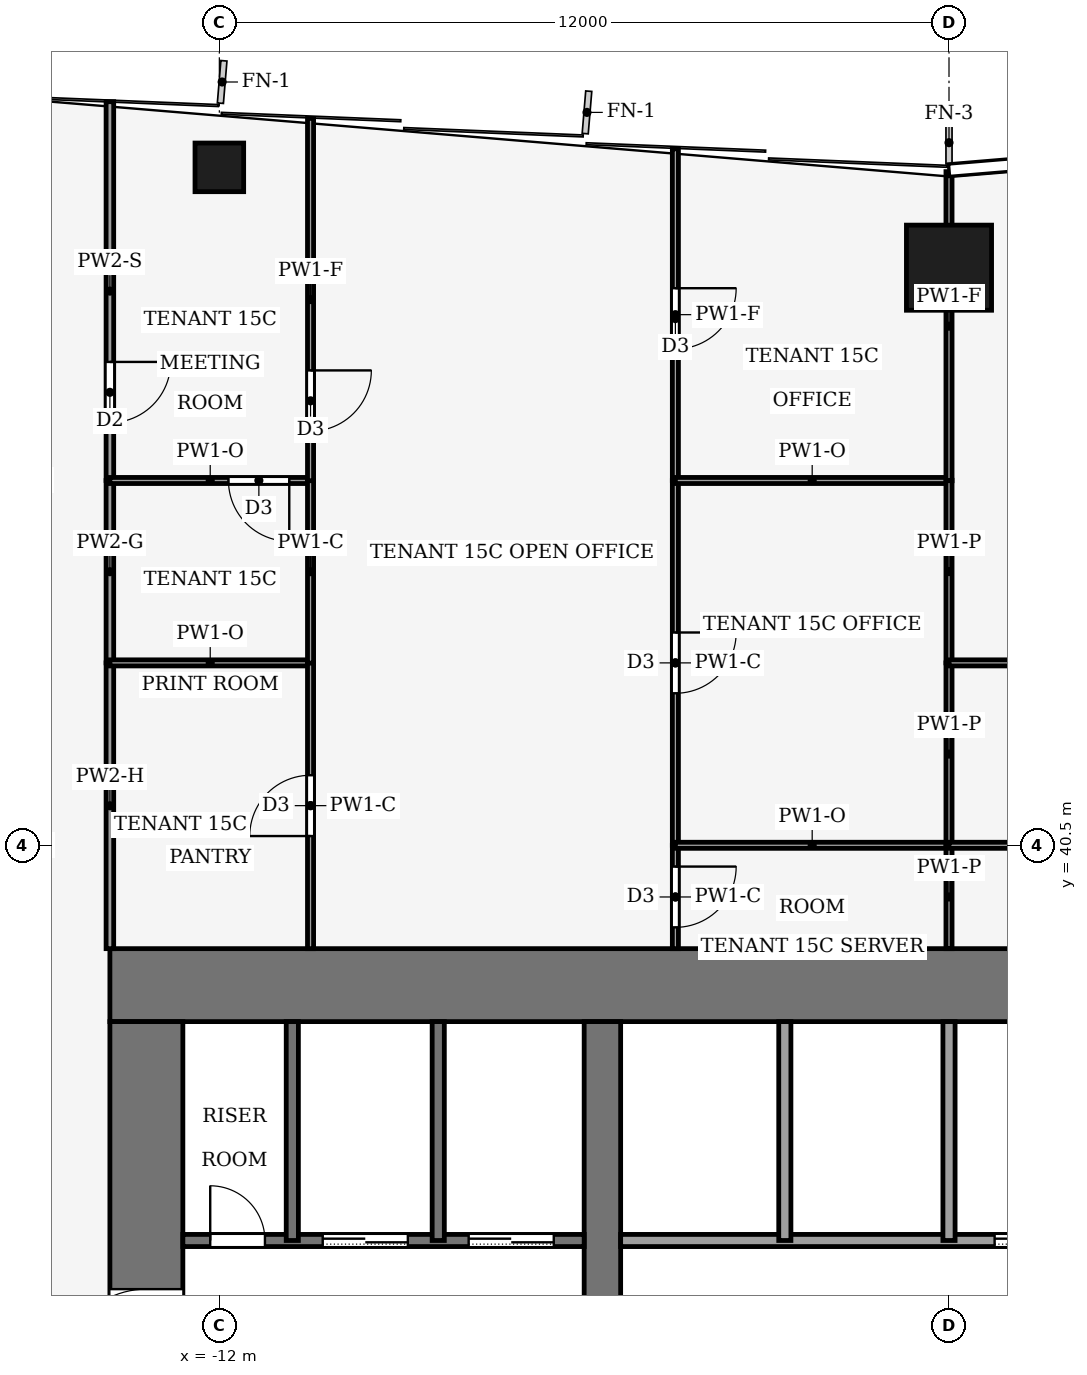
"""IFC4 building model, lengths in metres.
Left out: names, types, materials, properties, quantities, classifications, styles, units other than length and angle.
Written with IfcOpenShell. Run it as: python <this file> out.ifc"""

import sys

from ifc_helpers import new_model, si_unit, direction, frame, frame_2d, origin, origin_2d, place, context, subcontext, project, spatial, rectangle, hollow_rectangle, extrude, element, fill, save


model = new_model("IFC4")
c1 = context("Model", 3, precision=1e-05, world=origin(), true_north=direction((0.0, 1.0)))
c2 = subcontext(c1, "Body", "Model", "MODEL_VIEW")
j1 = project(units=[si_unit("LENGTHUNIT", "METRE"), si_unit("PLANEANGLEUNIT", "RADIAN")], contexts=[c1])
p1 = place(None, origin())
s1 = spatial("IfcSite", under=j1, at=p1, CompositionType="ELEMENT")
p2 = place(p1, origin())
s2 = spatial("IfcBuilding", under=s1, at=p2, CompositionType="ELEMENT")
p3 = place(p2, frame((0.0, 0.0, 70.0)))
s3 = spatial("IfcBuildingStorey", under=s2, at=p3, CompositionType="ELEMENT", Elevation=70.0)
p4 = place(p3, frame((-13.8, 38.2, -0.13), z_axis=(0.0, 0.0, 1.0), x_axis=(1.0, 0.0, 0.0)))
e1 = element("IfcWall", 1, at=p4, inside=s3, PredefinedType="SHEAR", context=c2, shape_type="SweptSolid", body=[
    extrude(rectangle(XDim=27.6, YDim=1.2, at=frame_2d((13.8, 0.0))), origin(), (0.0, 0.0, 1.0), 4.0),
])
p5 = place(p3, frame((-13.2, 18.4, -0.13), z_axis=(0.0, 0.0, 1.0), x_axis=(0.0, 1.0, 0.0)))
e2 = element("IfcWall", 2, at=p5, inside=s3, PredefinedType="SHEAR", context=c2, shape_type="SweptSolid", body=[
    extrude(rectangle(XDim=19.2, YDim=1.2, at=frame_2d((9.6, 0.0))), origin(), (0.0, 0.0, 1.0), 4.0),
])
p6 = place(p5, frame((2.8, 0.0, 0.13)))
e3 = element("IfcOpeningElement", 3, at=p6, cuts=e2, PredefinedType="OPENING", context=c2, shape_type="SweptSolid", body=[
    extrude(rectangle(XDim=2.4, YDim=2.4, at=frame_2d((1.2, 1.2))), frame((0.0, 0.61, 0.0), z_axis=(0.0, -1.0, 0.0), x_axis=(1.0, 0.0, 0.0)), (0.0, 0.0, 1.0), 1.22),
])
p7 = place(p5, frame((13.4, 0.0, 0.13)))
e4 = element("IfcOpeningElement", 4, at=p7, cuts=e2, PredefinedType="OPENING", context=c2, shape_type="SweptSolid", body=[
    extrude(rectangle(XDim=1.4, YDim=2.2, at=frame_2d((0.7, 1.1))), frame((0.0, 0.61, 0.0), z_axis=(0.0, -1.0, 0.0), x_axis=(1.0, 0.0, 0.0)), (0.0, 0.0, 1.0), 1.22),
])
p8 = place(p3, frame((-5.7, 18.4, -0.13), z_axis=(0.0, 0.0, 1.0), x_axis=(0.0, 1.0, 0.0)))
e5 = element("IfcWall", 5, at=p8, inside=s3, PredefinedType="SHEAR", context=c2, shape_type="SweptSolid", body=[
    extrude(rectangle(XDim=19.2, YDim=0.6, at=frame_2d((9.6, 0.0))), origin(), (0.0, 0.0, 1.0), 4.0),
])
p9 = place(p8, frame((8.35, 0.0, 0.13)))
e6 = element("IfcOpeningElement", 6, at=p9, cuts=e5, PredefinedType="OPENING", context=c2, shape_type="SweptSolid", body=[
    extrude(rectangle(XDim=0.9, YDim=2.1, at=frame_2d((0.45, 1.05))), frame((0.0, 0.31, 0.0), z_axis=(0.0, -1.0, 0.0), x_axis=(1.0, 0.0, 0.0)), (0.0, 0.0, 1.0), 0.62),
])
p10 = place(p3, frame((0.0, 50.0, 0.0), z_axis=(0.0, 0.0, 1.0), x_axis=(1.0, 0.0, 0.0)))
e7 = element("IfcColumn", 7, at=p10, inside=s3, PredefinedType="COLUMN", context=c2, shape_type="SweptSolid", body=[
    extrude(hollow_rectangle(XDim=1.4, YDim=1.4, WallThickness=0.08, at=origin_2d()), origin(), (0.0, 0.0, 1.0), 4.0),
])
p11 = place(p3, frame((-12.0, 51.65, 0.0), z_axis=(0.0, 0.0, 1.0), x_axis=(1.0, 0.0, 0.0)))
e8 = element("IfcColumn", 8, at=p11, inside=s3, PredefinedType="COLUMN", context=c2, shape_type="SweptSolid", body=[
    extrude(hollow_rectangle(XDim=0.8, YDim=0.8, WallThickness=0.04, at=origin_2d()), origin(), (0.0, 0.0, 1.0), 4.0),
])
p12 = place(p3, frame((-12.6, 34.0, 0.0), z_axis=(0.0, 0.0, 1.0), x_axis=(1.0, 0.0, 0.0)))
e9 = element("IfcWall", 9, at=p12, inside=s3, PredefinedType="PARTITIONING", context=c2, shape_type="SweptSolid", body=[
    extrude(rectangle(XDim=6.6, YDim=0.2, at=frame_2d((3.3, 0.0))), origin(), (0.0, 0.0, 1.0), 3.87),
])
p13 = place(p12, frame((4.7, 0.0, 0.0)))
e10 = element("IfcOpeningElement", 10, at=p13, cuts=e9, PredefinedType="OPENING", context=c2, shape_type="SweptSolid", body=[
    extrude(rectangle(XDim=1.4, YDim=2.2, at=frame_2d((0.7, 1.1))), frame((0.0, 0.11, 0.0), z_axis=(0.0, -1.0, 0.0), x_axis=(1.0, 0.0, 0.0)), (0.0, 0.0, 1.0), 0.22),
])
p14 = place(p12, frame((2.3, 0.0, 0.0)))
e11 = element("IfcOpeningElement", 11, at=p14, cuts=e9, PredefinedType="OPENING", context=c2, shape_type="SweptSolid", body=[
    extrude(rectangle(XDim=1.4, YDim=2.2, at=frame_2d((0.7, 1.1))), frame((0.0, 0.11, 0.0), z_axis=(0.0, -1.0, 0.0), x_axis=(1.0, 0.0, 0.0)), (0.0, 0.0, 1.0), 0.22),
])
p15 = place(p12, frame((0.45, 0.0, 0.0)))
e12 = element("IfcOpeningElement", 12, at=p15, cuts=e9, PredefinedType="OPENING", context=c2, shape_type="SweptSolid", body=[
    extrude(rectangle(XDim=0.9, YDim=2.1, at=frame_2d((0.45, 1.05))), frame((0.0, 0.11, 0.0), z_axis=(0.0, -1.0, 0.0), x_axis=(1.0, 0.0, 0.0)), (0.0, 0.0, 1.0), 0.22),
])
p16 = place(p3, frame((-5.4, 34.0, 0.0), z_axis=(0.0, 0.0, 1.0), x_axis=(1.0, 0.0, 0.0)))
e13 = element("IfcWall", 13, at=p16, inside=s3, PredefinedType="PARTITIONING", context=c2, shape_type="SweptSolid", body=[
    extrude(rectangle(XDim=10.8, YDim=0.2, at=frame_2d((5.4, 0.0))), origin(), (0.0, 0.0, 1.0), 3.87),
])
p17 = place(p16, frame((6.15, 0.0, 0.0)))
e14 = element("IfcOpeningElement", 14, at=p17, cuts=e13, PredefinedType="OPENING", context=c2, shape_type="SweptSolid", body=[
    extrude(rectangle(XDim=1.2, YDim=2.2, at=frame_2d((0.6, 1.1))), frame((0.0, 0.11, 0.0), z_axis=(0.0, -1.0, 0.0), x_axis=(1.0, 0.0, 0.0)), (0.0, 0.0, 1.0), 0.22),
])
p18 = place(p16, frame((8.95, 0.0, 0.0)))
e15 = element("IfcOpeningElement", 15, at=p18, cuts=e13, PredefinedType="OPENING", context=c2, shape_type="SweptSolid", body=[
    extrude(rectangle(XDim=1.0, YDim=2.1, at=frame_2d((0.5, 1.05))), frame((0.0, 0.11, 0.0), z_axis=(0.0, -1.0, 0.0), x_axis=(1.0, 0.0, 0.0)), (0.0, 0.0, 1.0), 0.22),
])
for number, where, z_axis, x_axis in (
    (16, (-10.8, 34.0, 0.0), (0.0, 0.0, 1.0), (0.0, 1.0, 0.0)),
    (17, (-8.4, 34.0, 0.0), (0.0, 0.0, 1.0), (0.0, 1.0, 0.0)),
    (18, (-2.7, 34.0, 0.0), (0.0, 0.0, 1.0), (0.0, 1.0, 0.0)),
    (19, (0.0, 34.0, 0.0), (0.0, 0.0, 1.0), (0.0, 1.0, 0.0)),
):
    element("IfcWall", number, at=place(p3, frame(where, z_axis=z_axis, x_axis=x_axis)), inside=s3, PredefinedType="PARTITIONING", context=c2, shape_type="SweptSolid", body=[
        extrude(rectangle(XDim=3.6, YDim=0.2, at=frame_2d((1.8, 0.0))), origin(), (0.0, 0.0, 1.0), 3.87),
    ])
p19 = place(p3, frame((-13.8, 38.8, 0.0), z_axis=(0.0, 0.0, 1.0), x_axis=(0.0, 1.0, 0.0)))
e20 = element("IfcWall", 20, at=p19, inside=s3, PredefinedType="PARTITIONING", context=c2, shape_type="SweptSolid", body=[
    extrude(rectangle(XDim=4.7, YDim=0.125, at=frame_2d((2.35, 0.0))), origin(), (0.0, 0.0, 1.0), 3.14),
])
p20 = place(p3, frame((-13.8, 43.5, 0.0), z_axis=(0.0, 0.0, 1.0), x_axis=(0.0, 1.0, 0.0)))
e21 = element("IfcWall", 21, at=p20, inside=s3, PredefinedType="PARTITIONING", context=c2, shape_type="SweptSolid", body=[
    extrude(rectangle(XDim=3.0, YDim=0.125, at=frame_2d((1.5, 0.0))), origin(), (0.0, 0.0, 1.0), 3.87),
])
p21 = place(p3, frame((-13.8, 52.73, 0.0), z_axis=(0.0, 0.0, 1.0), x_axis=(0.0, -1.0, 0.0)))
e22 = element("IfcWall", 22, at=p21, inside=s3, PredefinedType="PARTITIONING", context=c2, shape_type="SweptSolid", body=[
    extrude(rectangle(XDim=6.23, YDim=0.125, at=frame_2d((3.115, 0.0))), origin(), (0.0, 0.0, 1.0), 3.04),
])
p22 = place(p21, frame((4.28, 0.0, 0.0)))
e23 = element("IfcOpeningElement", 23, at=p22, cuts=e22, PredefinedType="OPENING", context=c2, shape_type="SweptSolid", body=[
    extrude(rectangle(XDim=1.0, YDim=2.1, at=frame_2d((0.5, 1.05))), frame((0.0, 0.073, 0.0), z_axis=(0.0, -1.0, 0.0), x_axis=(1.0, 0.0, 0.0)), (0.0, 0.0, 1.0), 0.145),
])
p23 = place(p3, frame((-10.5, 43.5, 0.0), z_axis=(0.0, 0.0, 1.0), x_axis=(-1.0, 0.0, 0.0)))
e24 = element("IfcWall", 24, at=p23, inside=s3, PredefinedType="PARTITIONING", context=c2, shape_type="SweptSolid", body=[
    extrude(rectangle(XDim=3.3, YDim=0.1, at=frame_2d((1.65, 0.0))), origin(), (0.0, 0.0, 1.0), 3.39),
])
p24 = place(p3, frame((-10.5, 38.8, 0.0), z_axis=(0.0, 0.0, 1.0), x_axis=(0.0, 1.0, 0.0)))
e25 = element("IfcWall", 25, at=p24, inside=s3, PredefinedType="PARTITIONING", context=c2, shape_type="SweptSolid", body=[
    extrude(rectangle(XDim=4.704, YDim=0.1, at=frame_2d((2.352, 0.0))), origin(), (0.0, 0.0, 1.0), 3.87),
])
p25 = place(p24, frame((1.852, 0.0, 0.0)))
e26 = element("IfcOpeningElement", 26, at=p25, cuts=e25, PredefinedType="OPENING", context=c2, shape_type="SweptSolid", body=[
    extrude(rectangle(XDim=1.0, YDim=2.1, at=frame_2d((0.5, 1.05))), frame((0.0, 0.06, 0.0), z_axis=(0.0, -1.0, 0.0), x_axis=(1.0, 0.0, 0.0)), (0.0, 0.0, 1.0), 0.12),
])
p26 = place(p3, frame((-10.5, 46.5, 0.0), z_axis=(0.0, 0.0, 1.0), x_axis=(-1.0, 0.0, 0.0)))
e27 = element("IfcWall", 27, at=p26, inside=s3, PredefinedType="PARTITIONING", context=c2, shape_type="SweptSolid", body=[
    extrude(rectangle(XDim=3.3, YDim=0.1, at=frame_2d((1.65, 0.0))), origin(), (0.0, 0.0, 1.0), 3.39),
])
p27 = place(p26, frame((0.35, 0.0, 0.0)))
e28 = element("IfcOpeningElement", 28, at=p27, cuts=e27, PredefinedType="OPENING", context=c2, shape_type="SweptSolid", body=[
    extrude(rectangle(XDim=1.0, YDim=2.1, at=frame_2d((0.5, 1.05))), frame((0.0, 0.06, 0.0), z_axis=(0.0, -1.0, 0.0), x_axis=(1.0, 0.0, 0.0)), (0.0, 0.0, 1.0), 0.12),
])
p28 = place(p3, frame((-10.5, 43.496, 0.0), z_axis=(0.0, 0.0, 1.0), x_axis=(0.0, 1.0, 0.0)))
e29 = element("IfcWall", 29, at=p28, inside=s3, PredefinedType="PARTITIONING", context=c2, shape_type="SweptSolid", body=[
    extrude(rectangle(XDim=3.008, YDim=0.1, at=frame_2d((1.504, 0.0))), origin(), (0.0, 0.0, 1.0), 3.87),
])
p29 = place(p3, frame((-10.5, 52.455, 0.0), z_axis=(0.0, 0.0, 1.0), x_axis=(0.0, -1.0, 0.0)))
e30 = element("IfcWall", 30, at=p29, inside=s3, PredefinedType="PARTITIONING", context=c2, shape_type="SweptSolid", body=[
    extrude(rectangle(XDim=5.959, YDim=0.1, at=frame_2d((2.979, 0.0))), origin(), (0.0, 0.0, 1.0), 3.04),
])
p30 = place(p29, frame((4.145, 0.0, 0.0)))
e31 = element("IfcOpeningElement", 31, at=p30, cuts=e30, PredefinedType="OPENING", context=c2, shape_type="SweptSolid", body=[
    extrude(rectangle(XDim=1.0, YDim=2.1, at=frame_2d((0.5, 1.05))), frame((0.0, 0.06, 0.0), z_axis=(0.0, -1.0, 0.0), x_axis=(1.0, 0.0, 0.0)), (0.0, 0.0, 1.0), 0.12),
])
p31 = place(p3, frame((-4.5, 40.5, 0.0), z_axis=(0.0, 0.0, 1.0), x_axis=(0.0, -1.0, 0.0)))
e32 = element("IfcWall", 32, at=p31, inside=s3, PredefinedType="PARTITIONING", context=c2, shape_type="SweptSolid", body=[
    extrude(rectangle(XDim=1.7, YDim=0.1, at=frame_2d((0.85, 0.0))), origin(), (0.0, 0.0, 1.0), 3.87),
])
p32 = place(p31, frame((0.35, 0.0, 0.0)))
e33 = element("IfcOpeningElement", 33, at=p32, cuts=e32, PredefinedType="OPENING", context=c2, shape_type="SweptSolid", body=[
    extrude(rectangle(XDim=1.0, YDim=2.1, at=frame_2d((0.5, 1.05))), frame((0.0, 0.06, 0.0), z_axis=(0.0, -1.0, 0.0), x_axis=(1.0, 0.0, 0.0)), (0.0, 0.0, 1.0), 0.12),
])
p33 = place(p3, frame((-4.5, 46.5, 0.0), z_axis=(0.0, 0.0, 1.0), x_axis=(0.0, -1.0, 0.0)))
e34 = element("IfcWall", 34, at=p33, inside=s3, PredefinedType="PARTITIONING", context=c2, shape_type="SweptSolid", body=[
    extrude(rectangle(XDim=6.0, YDim=0.1, at=frame_2d((3.0, 0.0))), origin(), (0.0, 0.0, 1.0), 3.87),
])
p34 = place(p33, frame((2.5, 0.0, 0.0)))
e35 = element("IfcOpeningElement", 35, at=p34, cuts=e34, PredefinedType="OPENING", context=c2, shape_type="SweptSolid", body=[
    extrude(rectangle(XDim=1.0, YDim=2.1, at=frame_2d((0.5, 1.05))), frame((0.0, 0.06, 0.0), z_axis=(0.0, -1.0, 0.0), x_axis=(1.0, 0.0, 0.0)), (0.0, 0.0, 1.0), 0.12),
])
p35 = place(p3, frame((-4.5, 51.955, 0.0), z_axis=(0.0, 0.0, 1.0), x_axis=(0.0, -1.0, 0.0)))
e36 = element("IfcWall", 36, at=p35, inside=s3, PredefinedType="PARTITIONING", context=c2, shape_type="SweptSolid", body=[
    extrude(rectangle(XDim=5.455, YDim=0.1, at=frame_2d((2.728, 0.0))), origin(), (0.0, 0.0, 1.0), 3.04),
])
p36 = place(p35, frame((2.292, 0.0, 0.0)))
e37 = element("IfcOpeningElement", 37, at=p36, cuts=e36, PredefinedType="OPENING", context=c2, shape_type="SweptSolid", body=[
    extrude(rectangle(XDim=1.0, YDim=2.1, at=frame_2d((0.5, 1.05))), frame((0.0, 0.06, 0.0), z_axis=(0.0, -1.0, 0.0), x_axis=(1.0, 0.0, 0.0)), (0.0, 0.0, 1.0), 0.12),
])
p37 = place(p3, frame((0.0, 40.5, 0.0), z_axis=(0.0, 0.0, 1.0), x_axis=(-1.0, 0.0, 0.0)))
e38 = element("IfcWall", 38, at=p37, inside=s3, PredefinedType="PARTITIONING", context=c2, shape_type="SweptSolid", body=[
    extrude(rectangle(XDim=4.5, YDim=0.1, at=frame_2d((2.25, 0.0))), origin(), (0.0, 0.0, 1.0), 3.39),
])
p38 = place(p3, frame((0.0, 38.8, 0.0), z_axis=(0.0, 0.0, 1.0), x_axis=(0.0, 1.0, 0.0)))
e39 = element("IfcWall", 39, at=p38, inside=s3, PredefinedType="PARTITIONING", context=c2, shape_type="SweptSolid", body=[
    extrude(rectangle(XDim=1.7, YDim=0.1, at=frame_2d((0.85, 0.0))), origin(), (0.0, 0.0, 1.0), 3.44),
])
p39 = place(p3, frame((0.0, 46.5, 0.0), z_axis=(0.0, 0.0, 1.0), x_axis=(-1.0, 0.0, 0.0)))
e40 = element("IfcWall", 40, at=p39, inside=s3, PredefinedType="PARTITIONING", context=c2, shape_type="SweptSolid", body=[
    extrude(rectangle(XDim=4.5, YDim=0.1, at=frame_2d((2.25, 0.0))), origin(), (0.0, 0.0, 1.0), 3.39),
])
p40 = place(p3, frame((0.0, 40.5, 0.0), z_axis=(0.0, 0.0, 1.0), x_axis=(0.0, 1.0, 0.0)))
e41 = element("IfcWall", 41, at=p40, inside=s3, PredefinedType="PARTITIONING", context=c2, shape_type="SweptSolid", body=[
    extrude(rectangle(XDim=3.0, YDim=0.1, at=frame_2d((1.5, 0.0))), origin(), (0.0, 0.0, 1.0), 3.44),
])
p41 = place(p3, frame((0.0, 43.5, 0.0), z_axis=(0.0, 0.0, 1.0), x_axis=(0.0, 1.0, 0.0)))
e42 = element("IfcWall", 42, at=p41, inside=s3, PredefinedType="PARTITIONING", context=c2, shape_type="SweptSolid", body=[
    extrude(rectangle(XDim=3.004, YDim=0.1, at=frame_2d((1.502, 0.0))), origin(), (0.0, 0.0, 1.0), 3.44),
])
p42 = place(p3, frame((0.0, 46.496, 0.0), z_axis=(0.0, 0.0, 1.0), x_axis=(0.0, 1.0, 0.0)))
e43 = element("IfcWall", 43, at=p42, inside=s3, PredefinedType="PARTITIONING", context=c2, shape_type="SweptSolid", body=[
    extrude(rectangle(XDim=5.084, YDim=0.1, at=frame_2d((2.542, 0.0))), origin(), (0.0, 0.0, 1.0), 3.04),
])
p43 = place(p3, frame((7.5, 40.5, 0.0), z_axis=(0.0, 0.0, 1.0), x_axis=(-1.0, 0.0, 0.0)))
e44 = element("IfcWall", 44, at=p43, inside=s3, PredefinedType="PARTITIONING", context=c2, shape_type="SweptSolid", body=[
    extrude(rectangle(XDim=7.5, YDim=0.1, at=frame_2d((3.75, 0.0))), origin(), (0.0, 0.0, 1.0), 3.39),
])
p44 = place(p3, frame((0.0, 43.5, 0.0), z_axis=(0.0, 0.0, 1.0), x_axis=(1.0, 0.0, 0.0)))
e45 = element("IfcWall", 45, at=p44, inside=s3, PredefinedType="PARTITIONING", context=c2, shape_type="SweptSolid", body=[
    extrude(rectangle(XDim=7.5, YDim=0.1, at=frame_2d((3.75, 0.0))), origin(), (0.0, 0.0, 1.0), 3.39),
])
p45 = place(p44, frame((3.25, 0.0, 0.0)))
e46 = element("IfcOpeningElement", 46, at=p45, cuts=e45, PredefinedType="OPENING", context=c2, shape_type="SweptSolid", body=[
    extrude(rectangle(XDim=1.0, YDim=2.1, at=frame_2d((0.5, 1.05))), frame((0.0, 0.06, 0.0), z_axis=(0.0, -1.0, 0.0), x_axis=(1.0, 0.0, 0.0)), (0.0, 0.0, 1.0), 0.12),
])
p46 = place(p17, origin())
e47 = element("IfcDoor", 47, at=p46, inside=s3, OperationType="SLIDING_TO_LEFT", PredefinedType="DOOR", context=c2, shape_type="SweptSolid", body=[
    extrude(rectangle(XDim=1.2, YDim=2.2, at=frame_2d((0.6, 1.1))), frame((0.0, 0.025, 0.0), z_axis=(0.0, -1.0, 0.0), x_axis=(1.0, 0.0, 0.0)), (0.0, 0.0, 1.0), 0.05),
])
fill(e14, e47)
p47 = place(p13, origin())
e48 = element("IfcDoor", 48, at=p47, inside=s3, OperationType="SLIDING_TO_LEFT", PredefinedType="DOOR", context=c2, shape_type="SweptSolid", body=[
    extrude(rectangle(XDim=1.4, YDim=2.2, at=frame_2d((0.7, 1.1))), frame((0.0, 0.025, 0.0), z_axis=(0.0, -1.0, 0.0), x_axis=(1.0, 0.0, 0.0)), (0.0, 0.0, 1.0), 0.05),
])
fill(e10, e48)
p48 = place(p14, origin())
e49 = element("IfcDoor", 49, at=p48, inside=s3, OperationType="SLIDING_TO_LEFT", PredefinedType="DOOR", context=c2, shape_type="SweptSolid", body=[
    extrude(rectangle(XDim=1.4, YDim=2.2, at=frame_2d((0.7, 1.1))), frame((0.0, 0.025, 0.0), z_axis=(0.0, -1.0, 0.0), x_axis=(1.0, 0.0, 0.0)), (0.0, 0.0, 1.0), 0.05),
])
fill(e11, e49)
p49 = place(p15, origin())
e50 = element("IfcDoor", 50, at=p49, inside=s3, OperationType="SINGLE_SWING_RIGHT", PredefinedType="DOOR", context=c2, shape_type="SweptSolid", body=[
    extrude(rectangle(XDim=0.9, YDim=2.1, at=frame_2d((0.45, 1.05))), frame((0.0, 0.025, 0.0), z_axis=(0.0, -1.0, 0.0), x_axis=(1.0, 0.0, 0.0)), (0.0, 0.0, 1.0), 0.05),
])
fill(e12, e50)
p50 = place(p7, origin())
e51 = element("IfcDoor", 51, at=p50, inside=s3, OperationType="SINGLE_SWING_LEFT", PredefinedType="DOOR", context=c2, shape_type="SweptSolid", body=[
    extrude(rectangle(XDim=1.4, YDim=2.2, at=frame_2d((0.7, 1.1))), frame((0.0, 0.025, 0.0), z_axis=(0.0, -1.0, 0.0), x_axis=(1.0, 0.0, 0.0)), (0.0, 0.0, 1.0), 0.05),
])
fill(e4, e51)
p51 = place(p22, origin())
e52 = element("IfcDoor", 52, at=p51, inside=s3, OperationType="SINGLE_SWING_RIGHT", PredefinedType="DOOR", context=c2, shape_type="SweptSolid", body=[
    extrude(rectangle(XDim=1.0, YDim=2.1, at=frame_2d((0.5, 1.05))), frame((0.0, 0.025, 0.0), z_axis=(0.0, -1.0, 0.0), x_axis=(1.0, 0.0, 0.0)), (0.0, 0.0, 1.0), 0.05),
])
fill(e23, e52)
p52 = place(p25, origin())
e53 = element("IfcDoor", 53, at=p52, inside=s3, OperationType="SINGLE_SWING_RIGHT", PredefinedType="DOOR", context=c2, shape_type="SweptSolid", body=[
    extrude(rectangle(XDim=1.0, YDim=2.1, at=frame_2d((0.5, 1.05))), frame((0.0, 0.025, 0.0), z_axis=(0.0, -1.0, 0.0), x_axis=(1.0, 0.0, 0.0)), (0.0, 0.0, 1.0), 0.05),
])
fill(e26, e53)
p53 = place(p27, origin())
e54 = element("IfcDoor", 54, at=p53, inside=s3, OperationType="SINGLE_SWING_LEFT", PredefinedType="DOOR", context=c2, shape_type="SweptSolid", body=[
    extrude(rectangle(XDim=1.0, YDim=2.1, at=frame_2d((0.5, 1.05))), frame((0.0, 0.025, 0.0), z_axis=(0.0, -1.0, 0.0), x_axis=(1.0, 0.0, 0.0)), (0.0, 0.0, 1.0), 0.05),
])
fill(e28, e54)
p54 = place(p30, origin())
e55 = element("IfcDoor", 55, at=p54, inside=s3, OperationType="SINGLE_SWING_RIGHT", PredefinedType="DOOR", context=c2, shape_type="SweptSolid", body=[
    extrude(rectangle(XDim=1.0, YDim=2.1, at=frame_2d((0.5, 1.05))), frame((0.0, 0.025, 0.0), z_axis=(0.0, -1.0, 0.0), x_axis=(1.0, 0.0, 0.0)), (0.0, 0.0, 1.0), 0.05),
])
fill(e31, e55)
p55 = place(p32, origin())
e56 = element("IfcDoor", 56, at=p55, inside=s3, OperationType="SINGLE_SWING_LEFT", PredefinedType="DOOR", context=c2, shape_type="SweptSolid", body=[
    extrude(rectangle(XDim=1.0, YDim=2.1, at=frame_2d((0.5, 1.05))), frame((0.0, 0.025, 0.0), z_axis=(0.0, -1.0, 0.0), x_axis=(1.0, 0.0, 0.0)), (0.0, 0.0, 1.0), 0.05),
])
fill(e33, e56)
p56 = place(p34, origin())
e57 = element("IfcDoor", 57, at=p56, inside=s3, OperationType="SINGLE_SWING_RIGHT", PredefinedType="DOOR", context=c2, shape_type="SweptSolid", body=[
    extrude(rectangle(XDim=1.0, YDim=2.1, at=frame_2d((0.5, 1.05))), frame((0.0, 0.025, 0.0), z_axis=(0.0, -1.0, 0.0), x_axis=(1.0, 0.0, 0.0)), (0.0, 0.0, 1.0), 0.05),
])
fill(e35, e57)
p57 = place(p36, origin())
e58 = element("IfcDoor", 58, at=p57, inside=s3, OperationType="SINGLE_SWING_RIGHT", PredefinedType="DOOR", context=c2, shape_type="SweptSolid", body=[
    extrude(rectangle(XDim=1.0, YDim=2.1, at=frame_2d((0.5, 1.05))), frame((0.0, 0.025, 0.0), z_axis=(0.0, -1.0, 0.0), x_axis=(1.0, 0.0, 0.0)), (0.0, 0.0, 1.0), 0.05),
])
fill(e37, e58)
save(model, sys.argv[1])
